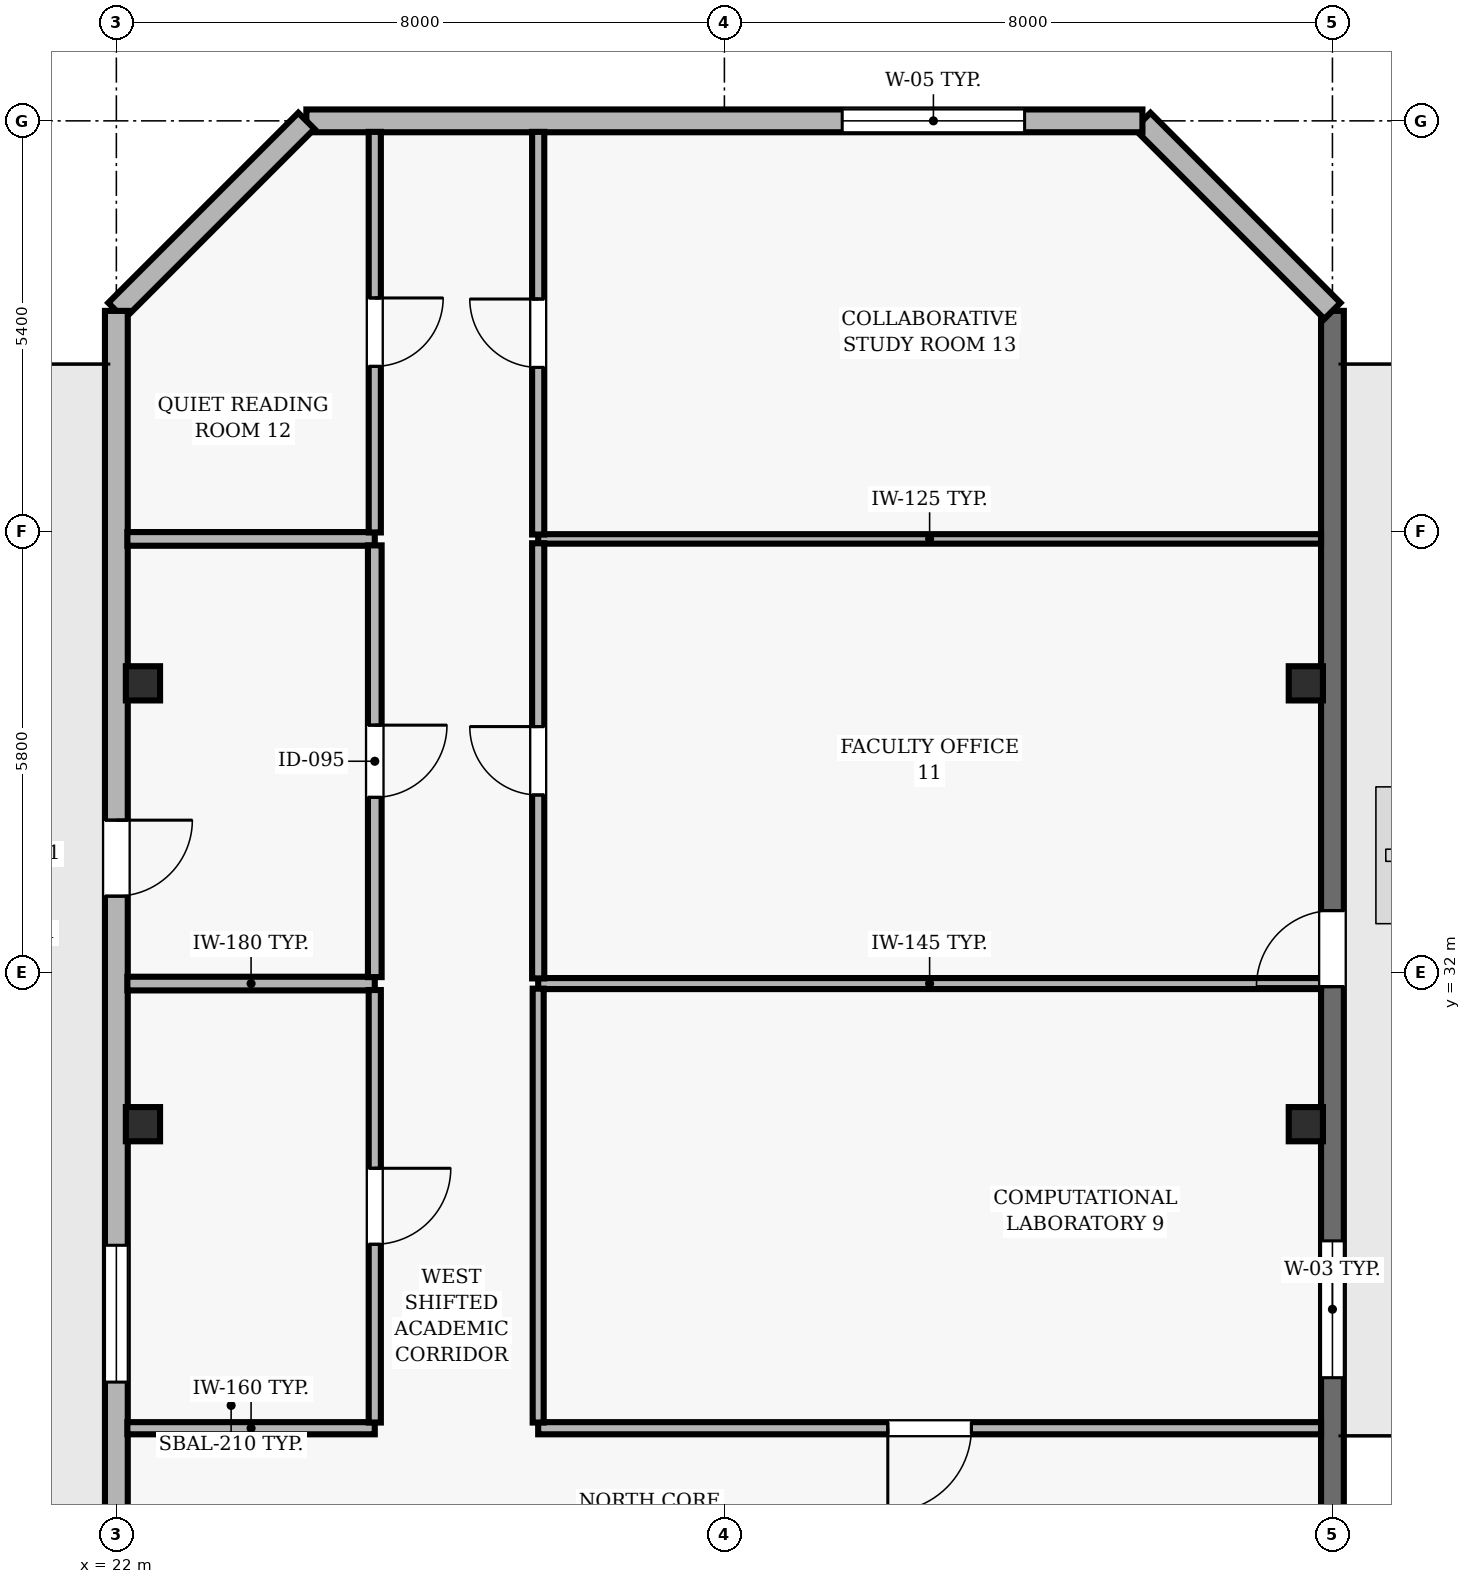
"""IFC4 building model, lengths in metres.
Left out: names, types, materials, properties, quantities, classifications, styles, units other than length and angle.
Written with IfcOpenShell. Run it as: python <this file> out.ifc"""

import sys

from ifc_helpers import new_model, si_unit, direction, frame, frame_2d, origin, origin_2d, place, context, subcontext, project, spatial, rectangle, hollow_rectangle, extrude, element, fill, save


model = new_model("IFC4")
c1 = context("Model", 3, precision=1e-05, world=origin(), true_north=direction((0.0, 1.0)))
c2 = subcontext(c1, "Body", "Model", "MODEL_VIEW")
j1 = project(units=[si_unit("LENGTHUNIT", "METRE"), si_unit("PLANEANGLEUNIT", "RADIAN")], contexts=[c1])
p1 = place(None, origin())
s1 = spatial("IfcSite", under=j1, at=p1, CompositionType="ELEMENT")
p2 = place(p1, origin())
s2 = spatial("IfcBuilding", under=s1, at=p2, CompositionType="ELEMENT")
p3 = place(p2, frame((0.0, 0.0, 175.8)))
s3 = spatial("IfcBuildingStorey", under=s2, at=p3, CompositionType="ELEMENT", Elevation=175.8)
for number, where, z_axis, x_axis in (
    (1, (22.35, 30.0, 0.0), (0.0, 0.0, 1.0), (1.0, 0.0, 0.0)),
    (2, (37.65, 30.0, 0.0), (0.0, 0.0, 1.0), (1.0, 0.0, 0.0)),
    (3, (22.35, 35.8, 0.0), (0.0, 0.0, 1.0), (1.0, 0.0, 0.0)),
    (4, (37.65, 35.8, 0.0), (0.0, 0.0, 1.0), (1.0, 0.0, 0.0)),
):
    element("IfcColumn", number, at=place(p3, frame(where, z_axis=z_axis, x_axis=x_axis)), inside=s3, PredefinedType="COLUMN", context=c2, shape_type="SweptSolid", body=[
        extrude(hollow_rectangle(XDim=0.45, YDim=0.45, WallThickness=0.02, at=origin_2d()), origin(), (0.0, 0.0, 1.0), 3.9),
    ])
p4 = place(p3, frame((38.0, 24.0, 0.0), z_axis=(0.0, 0.0, 1.0), x_axis=(0.0, 1.0, 0.0)))
e5 = element("IfcWall", 5, at=p4, inside=s3, PredefinedType="SOLIDWALL", context=c2, shape_type="SweptSolid", body=[
    extrude(rectangle(XDim=16.7, YDim=0.3, at=frame_2d((8.35, 0.0))), origin(), (0.0, 0.0, 1.0), 3.69),
])
p5 = place(p4, frame((7.81, 0.0, 0.0)))
e6 = element("IfcOpeningElement", 6, at=p5, cuts=e5, PredefinedType="OPENING", context=c2, shape_type="SweptSolid", body=[
    extrude(rectangle(XDim=1.0, YDim=2.2, at=frame_2d((0.5, 1.1))), frame((0.0, 0.16, 0.0), z_axis=(0.0, -1.0, 0.0), x_axis=(1.0, 0.0, 0.0)), (0.0, 0.0, 1.0), 0.32),
])
p6 = place(p4, frame((2.665, 0.0, 0.9)))
e7 = element("IfcOpeningElement", 7, at=p6, cuts=e5, PredefinedType="OPENING", context=c2, shape_type="SweptSolid", body=[
    extrude(rectangle(XDim=1.8, YDim=1.6, at=frame_2d((0.9, 0.8))), frame((0.0, 0.16, 0.0), z_axis=(0.0, -1.0, 0.0), x_axis=(1.0, 0.0, 0.0)), (0.0, 0.0, 1.0), 0.32),
])
p7 = place(p3, frame((38.0, 40.7, 0.0), z_axis=(0.0, 0.0, 1.0), x_axis=(-0.707106781187, 0.707106781187, 0.0)))
e8 = element("IfcWall", 8, at=p7, inside=s3, PredefinedType="SOLIDWALL", context=c2, shape_type="SweptSolid", body=[
    extrude(rectangle(XDim=3.536, YDim=0.3, at=frame_2d((1.768, 0.0))), origin(), (0.0, 0.0, 1.0), 3.69),
])
p8 = place(p3, frame((35.5, 43.2, 0.0), z_axis=(0.0, 0.0, 1.0), x_axis=(-1.0, 0.0, 0.0)))
e9 = element("IfcWall", 9, at=p8, inside=s3, PredefinedType="SOLIDWALL", context=c2, shape_type="SweptSolid", body=[
    extrude(rectangle(XDim=11.0, YDim=0.3, at=frame_2d((5.5, 0.0))), origin(), (0.0, 0.0, 1.0), 3.69),
])
p9 = place(p8, frame((1.55, 0.0, 0.9)))
e10 = element("IfcOpeningElement", 10, at=p9, cuts=e9, PredefinedType="OPENING", context=c2, shape_type="SweptSolid", body=[
    extrude(rectangle(XDim=2.4, YDim=1.6, at=frame_2d((1.2, 0.8))), frame((0.0, 0.16, 0.0), z_axis=(0.0, -1.0, 0.0), x_axis=(1.0, 0.0, 0.0)), (0.0, 0.0, 1.0), 0.32),
])
p10 = place(p3, frame((24.5, 43.2, 0.0), z_axis=(0.0, 0.0, 1.0), x_axis=(-0.707106781187, -0.707106781187, 0.0)))
e11 = element("IfcWall", 11, at=p10, inside=s3, PredefinedType="SOLIDWALL", context=c2, shape_type="SweptSolid", body=[
    extrude(rectangle(XDim=3.536, YDim=0.3, at=frame_2d((1.768, 0.0))), origin(), (0.0, 0.0, 1.0), 3.69),
])
p11 = place(p3, frame((22.0, 40.7, 0.0), z_axis=(0.0, 0.0, 1.0), x_axis=(0.0, -1.0, 0.0)))
e12 = element("IfcWall", 12, at=p11, inside=s3, PredefinedType="SOLIDWALL", context=c2, shape_type="SweptSolid", body=[
    extrude(rectangle(XDim=38.2, YDim=0.3, at=frame_2d((19.1, 0.0))), origin(), (0.0, 0.0, 1.0), 3.69),
])
p12 = place(p11, frame((6.7, 0.0, 0.0)))
e13 = element("IfcOpeningElement", 13, at=p12, cuts=e12, PredefinedType="OPENING", context=c2, shape_type="SweptSolid", body=[
    extrude(rectangle(XDim=1.0, YDim=2.2, at=frame_2d((0.5, 1.1))), frame((0.0, 0.16, 0.0), z_axis=(0.0, -1.0, 0.0), x_axis=(1.0, 0.0, 0.0)), (0.0, 0.0, 1.0), 0.32),
])
p13 = place(p11, frame((12.293, 0.0, 0.9)))
e14 = element("IfcOpeningElement", 14, at=p13, cuts=e12, PredefinedType="OPENING", context=c2, shape_type="SweptSolid", body=[
    extrude(rectangle(XDim=1.8, YDim=1.8, at=frame_2d((0.9, 0.9))), frame((0.0, 0.16, 0.0), z_axis=(0.0, -1.0, 0.0), x_axis=(1.0, 0.0, 0.0)), (0.0, 0.0, 1.0), 0.32),
])
p14 = place(p11, frame((18.2, 0.0, 0.9)))
e15 = element("IfcOpeningElement", 15, at=p14, cuts=e12, PredefinedType="OPENING", context=c2, shape_type="SweptSolid", body=[
    extrude(rectangle(XDim=1.8, YDim=1.8, at=frame_2d((0.9, 0.9))), frame((0.0, 0.16, 0.0), z_axis=(0.0, -1.0, 0.0), x_axis=(1.0, 0.0, 0.0)), (0.0, 0.0, 1.0), 0.32),
])
p15 = place(p11, frame((23.207, 0.0, 0.9)))
e16 = element("IfcOpeningElement", 16, at=p15, cuts=e12, PredefinedType="OPENING", context=c2, shape_type="SweptSolid", body=[
    extrude(rectangle(XDim=1.8, YDim=1.8, at=frame_2d((0.9, 0.9))), frame((0.0, 0.16, 0.0), z_axis=(0.0, -1.0, 0.0), x_axis=(1.0, 0.0, 0.0)), (0.0, 0.0, 1.0), 0.32),
])
p16 = place(p11, frame((29.114, 0.0, 0.9)))
e17 = element("IfcOpeningElement", 17, at=p16, cuts=e12, PredefinedType="OPENING", context=c2, shape_type="SweptSolid", body=[
    extrude(rectangle(XDim=1.8, YDim=1.8, at=frame_2d((0.9, 0.9))), frame((0.0, 0.16, 0.0), z_axis=(0.0, -1.0, 0.0), x_axis=(1.0, 0.0, 0.0)), (0.0, 0.0, 1.0), 0.32),
])
p17 = place(p3, frame((25.4, 26.0, 0.0), z_axis=(0.0, 0.0, 1.0), x_axis=(-1.0, 0.0, 0.0)))
e18 = element("IfcWall", 18, at=p17, inside=s3, PredefinedType="PARTITIONING", context=c2, shape_type="SweptSolid", body=[
    extrude(rectangle(XDim=3.255, YDim=0.16, at=frame_2d((1.627, 0.0))), origin(), (0.0, 0.0, 1.0), 3.69),
])
for number, where, z_axis, x_axis in (
    (19, (25.4, 31.85, 0.0), (0.0, 0.0, 1.0), (-1.0, 0.0, 0.0)),
    (20, (25.4, 37.7, 0.0), (0.0, 0.0, 1.0), (-1.0, 0.0, 0.0)),
):
    element("IfcWall", number, at=place(p3, frame(where, z_axis=z_axis, x_axis=x_axis)), inside=s3, PredefinedType="PARTITIONING", context=c2, shape_type="SweptSolid", body=[
        extrude(rectangle(XDim=3.255, YDim=0.18, at=frame_2d((1.627, 0.0))), origin(), (0.0, 0.0, 1.0), 3.69),
    ])
p18 = place(p3, frame((37.85, 26.0, 0.0), z_axis=(0.0, 0.0, 1.0), x_axis=(-1.0, 0.0, 0.0)))
e21 = element("IfcWall", 21, at=p18, inside=s3, PredefinedType="PARTITIONING", context=c2, shape_type="SweptSolid", body=[
    extrude(rectangle(XDim=10.3, YDim=0.16, at=frame_2d((5.15, 0.0))), origin(), (0.0, 0.0, 1.0), 3.69),
])
p19 = place(p18, frame((4.6, 0.0, 0.0)))
e22 = element("IfcOpeningElement", 22, at=p19, cuts=e21, PredefinedType="OPENING", context=c2, shape_type="SweptSolid", body=[
    extrude(rectangle(XDim=1.1, YDim=2.15, at=frame_2d((0.55, 1.075))), frame((0.0, 0.09, 0.0), z_axis=(0.0, -1.0, 0.0), x_axis=(1.0, 0.0, 0.0)), (0.0, 0.0, 1.0), 0.18),
])
p20 = place(p3, frame((37.85, 31.85, 0.0), z_axis=(0.0, 0.0, 1.0), x_axis=(-1.0, 0.0, 0.0)))
e23 = element("IfcWall", 23, at=p20, inside=s3, PredefinedType="PARTITIONING", context=c2, shape_type="SweptSolid", body=[
    extrude(rectangle(XDim=10.3, YDim=0.145, at=frame_2d((5.15, 0.0))), origin(), (0.0, 0.0, 1.0), 3.69),
])
p21 = place(p3, frame((37.85, 37.7, 0.0), z_axis=(0.0, 0.0, 1.0), x_axis=(-1.0, 0.0, 0.0)))
e24 = element("IfcWall", 24, at=p21, inside=s3, PredefinedType="PARTITIONING", context=c2, shape_type="SweptSolid", body=[
    extrude(rectangle(XDim=10.3, YDim=0.125, at=frame_2d((5.15, 0.0))), origin(), (0.0, 0.0, 1.0), 3.69),
])
p22 = place(p3, frame((25.4, 31.765, 0.0), z_axis=(0.0, 0.0, 1.0), x_axis=(0.0, -1.0, 0.0)))
e25 = element("IfcWall", 25, at=p22, inside=s3, PredefinedType="PARTITIONING", context=c2, shape_type="SweptSolid", body=[
    extrude(rectangle(XDim=5.69, YDim=0.16, at=frame_2d((2.845, 0.0))), origin(), (0.0, 0.0, 1.0), 3.69),
])
p23 = place(p22, frame((2.345, 0.0, 0.0)))
e26 = element("IfcOpeningElement", 26, at=p23, cuts=e25, PredefinedType="OPENING", context=c2, shape_type="SweptSolid", body=[
    extrude(rectangle(XDim=1.0, YDim=2.1, at=frame_2d((0.5, 1.05))), frame((0.0, 0.09, 0.0), z_axis=(0.0, -1.0, 0.0), x_axis=(1.0, 0.0, 0.0)), (0.0, 0.0, 1.0), 0.18),
])
p24 = place(p3, frame((25.4, 37.615, 0.0), z_axis=(0.0, 0.0, 1.0), x_axis=(0.0, -1.0, 0.0)))
e27 = element("IfcWall", 27, at=p24, inside=s3, PredefinedType="PARTITIONING", context=c2, shape_type="SweptSolid", body=[
    extrude(rectangle(XDim=5.68, YDim=0.18, at=frame_2d((2.84, 0.0))), origin(), (0.0, 0.0, 1.0), 3.69),
])
p25 = place(p24, frame((2.365, 0.0, 0.0)))
e28 = element("IfcOpeningElement", 28, at=p25, cuts=e27, PredefinedType="OPENING", context=c2, shape_type="SweptSolid", body=[
    extrude(rectangle(XDim=0.95, YDim=2.1, at=frame_2d((0.475, 1.05))), frame((0.0, 0.1, 0.0), z_axis=(0.0, -1.0, 0.0), x_axis=(1.0, 0.0, 0.0)), (0.0, 0.0, 1.0), 0.2),
])
p26 = place(p3, frame((25.4, 43.055, 0.0), z_axis=(0.0, 0.0, 1.0), x_axis=(0.0, -1.0, 0.0)))
e29 = element("IfcWall", 29, at=p26, inside=s3, PredefinedType="PARTITIONING", context=c2, shape_type="SweptSolid", body=[
    extrude(rectangle(XDim=5.27, YDim=0.16, at=frame_2d((2.635, 0.0))), origin(), (0.0, 0.0, 1.0), 3.69),
])
p27 = place(p26, frame((2.185, 0.0, 0.0)))
e30 = element("IfcOpeningElement", 30, at=p27, cuts=e29, PredefinedType="OPENING", context=c2, shape_type="SweptSolid", body=[
    extrude(rectangle(XDim=0.9, YDim=2.1, at=frame_2d((0.45, 1.05))), frame((0.0, 0.09, 0.0), z_axis=(0.0, -1.0, 0.0), x_axis=(1.0, 0.0, 0.0)), (0.0, 0.0, 1.0), 0.18),
])
p28 = place(p3, frame((27.55, 26.075, 0.0), z_axis=(0.0, 0.0, 1.0), x_axis=(0.0, 1.0, 0.0)))
e31 = element("IfcWall", 31, at=p28, inside=s3, PredefinedType="PARTITIONING", context=c2, shape_type="SweptSolid", body=[
    extrude(rectangle(XDim=5.708, YDim=0.145, at=frame_2d((2.854, 0.0))), origin(), (0.0, 0.0, 1.0), 3.69),
])
p29 = place(p3, frame((27.55, 31.918, 0.0), z_axis=(0.0, 0.0, 1.0), x_axis=(0.0, 1.0, 0.0)))
e32 = element("IfcWall", 32, at=p29, inside=s3, PredefinedType="PARTITIONING", context=c2, shape_type="SweptSolid", body=[
    extrude(rectangle(XDim=5.725, YDim=0.16, at=frame_2d((2.863, 0.0))), origin(), (0.0, 0.0, 1.0), 3.69),
])
p30 = place(p29, frame((2.413, 0.0, 0.0)))
e33 = element("IfcOpeningElement", 33, at=p30, cuts=e32, PredefinedType="OPENING", context=c2, shape_type="SweptSolid", body=[
    extrude(rectangle(XDim=0.9, YDim=2.1, at=frame_2d((0.45, 1.05))), frame((0.0, 0.09, 0.0), z_axis=(0.0, -1.0, 0.0), x_axis=(1.0, 0.0, 0.0)), (0.0, 0.0, 1.0), 0.18),
])
p31 = place(p3, frame((27.55, 37.758, 0.0), z_axis=(0.0, 0.0, 1.0), x_axis=(0.0, 1.0, 0.0)))
e34 = element("IfcWall", 34, at=p31, inside=s3, PredefinedType="PARTITIONING", context=c2, shape_type="SweptSolid", body=[
    extrude(rectangle(XDim=5.297, YDim=0.16, at=frame_2d((2.648, 0.0))), origin(), (0.0, 0.0, 1.0), 3.69),
])
p32 = place(p31, frame((2.198, 0.0, 0.0)))
e35 = element("IfcOpeningElement", 35, at=p32, cuts=e34, PredefinedType="OPENING", context=c2, shape_type="SweptSolid", body=[
    extrude(rectangle(XDim=0.9, YDim=2.1, at=frame_2d((0.45, 1.05))), frame((0.0, 0.09, 0.0), z_axis=(0.0, -1.0, 0.0), x_axis=(1.0, 0.0, 0.0)), (0.0, 0.0, 1.0), 0.18),
])
p33 = place(p5, origin())
e36 = element("IfcDoor", 36, at=p33, inside=s3, OperationType="SINGLE_SWING_LEFT", PredefinedType="DOOR", context=c2, shape_type="SweptSolid", body=[
    extrude(rectangle(XDim=1.0, YDim=2.2, at=frame_2d((0.5, 1.1))), frame((0.0, 0.025, 0.0), z_axis=(0.0, -1.0, 0.0), x_axis=(1.0, 0.0, 0.0)), (0.0, 0.0, 1.0), 0.05),
])
fill(e6, e36)
p34 = place(p6, origin())
e37 = element("IfcWindow", 37, at=p34, inside=s3, PartitioningType="SINGLE_PANEL", PredefinedType="WINDOW", context=c2, shape_type="SweptSolid", body=[
    extrude(rectangle(XDim=1.8, YDim=1.6, at=frame_2d((0.9, 0.8))), frame((0.0, 0.03, 0.0), z_axis=(0.0, -1.0, 0.0), x_axis=(1.0, 0.0, 0.0)), (0.0, 0.0, 1.0), 0.06),
])
fill(e7, e37)
p35 = place(p9, origin())
e38 = element("IfcWindow", 38, at=p35, inside=s3, PartitioningType="SINGLE_PANEL", PredefinedType="WINDOW", context=c2, shape_type="SweptSolid", body=[
    extrude(rectangle(XDim=2.4, YDim=1.6, at=frame_2d((1.2, 0.8))), frame((0.0, 0.03, 0.0), z_axis=(0.0, -1.0, 0.0), x_axis=(1.0, 0.0, 0.0)), (0.0, 0.0, 1.0), 0.06),
])
fill(e10, e38)
p36 = place(p12, origin())
e39 = element("IfcDoor", 39, at=p36, inside=s3, OperationType="SINGLE_SWING_LEFT", PredefinedType="DOOR", context=c2, shape_type="SweptSolid", body=[
    extrude(rectangle(XDim=1.0, YDim=2.2, at=frame_2d((0.5, 1.1))), frame((0.0, 0.025, 0.0), z_axis=(0.0, -1.0, 0.0), x_axis=(1.0, 0.0, 0.0)), (0.0, 0.0, 1.0), 0.05),
])
fill(e13, e39)
p37 = place(p13, origin())
e40 = element("IfcWindow", 40, at=p37, inside=s3, PartitioningType="SINGLE_PANEL", PredefinedType="WINDOW", context=c2, shape_type="SweptSolid", body=[
    extrude(rectangle(XDim=1.8, YDim=1.8, at=frame_2d((0.9, 0.9))), frame((0.0, 0.03, 0.0), z_axis=(0.0, -1.0, 0.0), x_axis=(1.0, 0.0, 0.0)), (0.0, 0.0, 1.0), 0.06),
])
fill(e14, e40)
p38 = place(p23, origin())
e41 = element("IfcDoor", 41, at=p38, inside=s3, OperationType="SINGLE_SWING_LEFT", PredefinedType="DOOR", context=c2, shape_type="SweptSolid", body=[
    extrude(rectangle(XDim=1.0, YDim=2.1, at=frame_2d((0.5, 1.05))), frame((0.0, 0.025, 0.0), z_axis=(0.0, -1.0, 0.0), x_axis=(1.0, 0.0, 0.0)), (0.0, 0.0, 1.0), 0.05),
])
fill(e26, e41)
p39 = place(p19, origin())
e42 = element("IfcDoor", 42, at=p39, inside=s3, OperationType="SINGLE_SWING_RIGHT", PredefinedType="DOOR", context=c2, shape_type="SweptSolid", body=[
    extrude(rectangle(XDim=1.1, YDim=2.15, at=frame_2d((0.55, 1.075))), frame((0.0, 0.025, 0.0), z_axis=(0.0, -1.0, 0.0), x_axis=(1.0, 0.0, 0.0)), (0.0, 0.0, 1.0), 0.05),
])
fill(e22, e42)
p40 = place(p25, origin())
e43 = element("IfcDoor", 43, at=p40, inside=s3, OperationType="SINGLE_SWING_LEFT", PredefinedType="DOOR", context=c2, shape_type="SweptSolid", body=[
    extrude(rectangle(XDim=0.95, YDim=2.1, at=frame_2d((0.475, 1.05))), frame((0.0, 0.025, 0.0), z_axis=(0.0, -1.0, 0.0), x_axis=(1.0, 0.0, 0.0)), (0.0, 0.0, 1.0), 0.05),
])
fill(e28, e43)
p41 = place(p30, origin())
e44 = element("IfcDoor", 44, at=p41, inside=s3, OperationType="SINGLE_SWING_RIGHT", PredefinedType="DOOR", context=c2, shape_type="SweptSolid", body=[
    extrude(rectangle(XDim=0.9, YDim=2.1, at=frame_2d((0.45, 1.05))), frame((0.0, 0.025, 0.0), z_axis=(0.0, -1.0, 0.0), x_axis=(1.0, 0.0, 0.0)), (0.0, 0.0, 1.0), 0.05),
])
fill(e33, e44)
p42 = place(p27, origin())
e45 = element("IfcDoor", 45, at=p42, inside=s3, OperationType="SINGLE_SWING_LEFT", PredefinedType="DOOR", context=c2, shape_type="SweptSolid", body=[
    extrude(rectangle(XDim=0.9, YDim=2.1, at=frame_2d((0.45, 1.05))), frame((0.0, 0.025, 0.0), z_axis=(0.0, -1.0, 0.0), x_axis=(1.0, 0.0, 0.0)), (0.0, 0.0, 1.0), 0.05),
])
fill(e30, e45)
p43 = place(p32, origin())
e46 = element("IfcDoor", 46, at=p43, inside=s3, OperationType="SINGLE_SWING_RIGHT", PredefinedType="DOOR", context=c2, shape_type="SweptSolid", body=[
    extrude(rectangle(XDim=0.9, YDim=2.1, at=frame_2d((0.45, 1.05))), frame((0.0, 0.025, 0.0), z_axis=(0.0, -1.0, 0.0), x_axis=(1.0, 0.0, 0.0)), (0.0, 0.0, 1.0), 0.05),
])
fill(e35, e46)
save(model, sys.argv[1])
